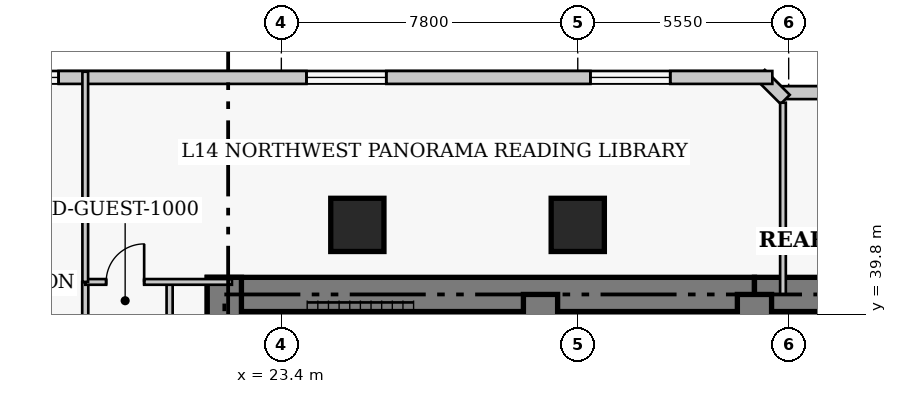
"""IFC4 building model, lengths in metres.
Left out: names, types, materials, properties, quantities, classifications, styles, units other than length and angle.
Written with IfcOpenShell. Run it as: python <this file> out.ifc"""

import sys

from ifc_helpers import new_model, si_unit, direction, frame, frame_2d, origin, origin_2d, place, context, subcontext, project, spatial, rectangle, extrude, element, fill, save


model = new_model("IFC4")
c1 = context("Model", 3, precision=1e-05, world=origin(), true_north=direction((0.0, 1.0)))
c2 = subcontext(c1, "Body", "Model", "MODEL_VIEW")
j1 = project(units=[si_unit("LENGTHUNIT", "METRE"), si_unit("PLANEANGLEUNIT", "RADIAN")], contexts=[c1])
p1 = place(None, origin())
s1 = spatial("IfcSite", under=j1, at=p1, CompositionType="ELEMENT")
p2 = place(p1, origin())
s2 = spatial("IfcBuilding", under=s1, at=p2, CompositionType="ELEMENT")
p3 = place(p2, frame((0.0, 0.0, 60.2)))
s3 = spatial("IfcBuildingStorey", under=s2, at=p3, CompositionType="ELEMENT", Elevation=60.2)
p4 = place(p3, frame((21.45, 40.32, 0.0), z_axis=(0.0, 0.0, 1.0), x_axis=(1.0, 0.0, 0.0)))
e1 = element("IfcWall", 1, at=p4, inside=s3, PredefinedType="SHEAR", context=c2, shape_type="SweptSolid", body=[
    extrude(rectangle(XDim=14.4, YDim=0.9, at=frame_2d((7.2, 0.0))), origin(), (0.0, 0.0, 1.0), 3.8),
])
p5 = place(p3, frame((35.85, 40.32, 0.0), z_axis=(0.0, 0.0, 1.0), x_axis=(1.0, 0.0, 0.0)))
e2 = element("IfcWall", 2, at=p5, inside=s3, PredefinedType="SHEAR", context=c2, shape_type="SweptSolid", body=[
    extrude(rectangle(XDim=12.6, YDim=0.9, at=frame_2d((6.3, 0.0))), origin(), (0.0, 0.0, 1.0), 3.8),
])
p6 = place(p3, frame((21.9, 27.05, 0.0), z_axis=(0.0, 0.0, 1.0), x_axis=(0.0, 1.0, 0.0)))
e3 = element("IfcWall", 3, at=p6, inside=s3, PredefinedType="SHEAR", context=c2, shape_type="SweptSolid", body=[
    extrude(rectangle(XDim=13.72, YDim=0.9, at=frame_2d((6.86, 0.0))), origin(), (0.0, 0.0, 1.0), 3.8),
])
p7 = place(p3, frame((30.22, 33.2, 0.0), z_axis=(0.0, 0.0, 1.0), x_axis=(0.0, 1.0, 0.0)))
e4 = element("IfcWall", 4, at=p7, inside=s3, PredefinedType="SHEAR", context=c2, shape_type="SweptSolid", body=[
    extrude(rectangle(XDim=7.12, YDim=0.9, at=frame_2d((3.56, 0.0))), origin(), (0.0, 0.0, 1.0), 3.8),
])
p8 = place(p3, frame((35.85, 36.37, 0.0), z_axis=(0.0, 0.0, 1.0), x_axis=(0.0, 1.0, 0.0)))
e5 = element("IfcWall", 5, at=p8, inside=s3, PredefinedType="SHEAR", context=c2, shape_type="SweptSolid", body=[
    extrude(rectangle(XDim=3.95, YDim=0.9, at=frame_2d((1.975, 0.0))), origin(), (0.0, 0.0, 1.0), 3.8),
])
p9 = place(p8, frame((0.88, 0.0, 0.0)))
e6 = element("IfcOpeningElement", 6, at=p9, cuts=e5, PredefinedType="OPENING", context=c2, shape_type="SweptSolid", body=[
    extrude(rectangle(XDim=1.1, YDim=2.15, at=frame_2d((0.55, 1.075))), frame((0.0, 0.46, 0.0), z_axis=(0.0, -1.0, 0.0), x_axis=(1.0, 0.0, 0.0)), (0.0, 0.0, 1.0), 0.92),
])
for number, where, z_axis, x_axis in (
    (7, (25.4, 42.15, 0.0), (0.0, 0.0, 1.0), (1.0, 0.0, 0.0)),
    (8, (31.2, 42.15, 0.0), (0.0, 0.0, 1.0), (1.0, 0.0, 0.0)),
):
    element("IfcColumn", number, at=place(p3, frame(where, z_axis=z_axis, x_axis=x_axis)), inside=s3, PredefinedType="COLUMN", context=c2, shape_type="SweptSolid", body=[
        extrude(rectangle(XDim=1.4, YDim=1.4, at=origin_2d()), origin(), (0.0, 0.0, 1.0), 3.8),
    ])
p10 = place(p3, frame((41.42, 45.63, 0.0), z_axis=(0.0, 0.0, 1.0), x_axis=(-1.0, 0.0, 0.0)))
e9 = element("IfcWall", 9, at=p10, inside=s3, PredefinedType="SOLIDWALL", context=c2, shape_type="SweptSolid", body=[
    extrude(rectangle(XDim=4.84, YDim=0.34, at=frame_2d((2.42, 0.0))), origin(), (0.0, 0.0, 1.0), 3.54),
])
p11 = place(p10, frame((1.37, 0.0, 0.85)))
e10 = element("IfcOpeningElement", 10, at=p11, cuts=e9, PredefinedType="OPENING", context=c2, shape_type="SweptSolid", body=[
    extrude(rectangle(XDim=2.1, YDim=1.85, at=frame_2d((1.05, 0.925))), frame((0.0, 0.18, 0.0), z_axis=(0.0, -1.0, 0.0), x_axis=(1.0, 0.0, 0.0)), (0.0, 0.0, 1.0), 0.36),
])
p12 = place(p3, frame((36.658, 45.451, 0.0), z_axis=(0.0, 0.0, 1.0), x_axis=(-0.707106781187, 0.707106781187, 0.0)))
e11 = element("IfcWall", 11, at=p12, inside=s3, PredefinedType="SOLIDWALL", context=c2, shape_type="SweptSolid", body=[
    extrude(rectangle(XDim=0.929, YDim=0.34, at=frame_2d((0.464, 0.0))), origin(), (0.0, 0.0, 1.0), 3.54),
])
p13 = place(p3, frame((36.32, 46.03, 0.0), z_axis=(0.0, 0.0, 1.0), x_axis=(-1.0, 0.0, 0.0)))
e12 = element("IfcWall", 12, at=p13, inside=s3, PredefinedType="SOLIDWALL", context=c2, shape_type="SweptSolid", body=[
    extrude(rectangle(XDim=29.89, YDim=0.34, at=frame_2d((14.945, 0.0))), origin(), (0.0, 0.0, 1.0), 3.54),
])
p14 = place(p13, frame((2.686, 0.0, 0.85)))
e13 = element("IfcOpeningElement", 13, at=p14, cuts=e12, PredefinedType="OPENING", context=c2, shape_type="SweptSolid", body=[
    extrude(rectangle(XDim=2.1, YDim=1.85, at=frame_2d((1.05, 0.925))), frame((0.0, 0.18, 0.0), z_axis=(0.0, -1.0, 0.0), x_axis=(1.0, 0.0, 0.0)), (0.0, 0.0, 1.0), 0.36),
])
p15 = place(p13, frame((10.159, 0.0, 0.85)))
e14 = element("IfcOpeningElement", 14, at=p15, cuts=e12, PredefinedType="OPENING", context=c2, shape_type="SweptSolid", body=[
    extrude(rectangle(XDim=2.1, YDim=1.85, at=frame_2d((1.05, 0.925))), frame((0.0, 0.18, 0.0), z_axis=(0.0, -1.0, 0.0), x_axis=(1.0, 0.0, 0.0)), (0.0, 0.0, 1.0), 0.36),
])
p16 = place(p13, frame((18.781, 0.0, 0.85)))
e15 = element("IfcOpeningElement", 15, at=p16, cuts=e12, PredefinedType="OPENING", context=c2, shape_type="SweptSolid", body=[
    extrude(rectangle(XDim=2.1, YDim=1.85, at=frame_2d((1.05, 0.925))), frame((0.0, 0.18, 0.0), z_axis=(0.0, -1.0, 0.0), x_axis=(1.0, 0.0, 0.0)), (0.0, 0.0, 1.0), 0.36),
])
p17 = place(p13, frame((25.104, 0.0, 0.85)))
e16 = element("IfcOpeningElement", 16, at=p17, cuts=e12, PredefinedType="OPENING", context=c2, shape_type="SweptSolid", body=[
    extrude(rectangle(XDim=2.1, YDim=1.85, at=frame_2d((1.05, 0.925))), frame((0.0, 0.18, 0.0), z_axis=(0.0, -1.0, 0.0), x_axis=(1.0, 0.0, 0.0)), (0.0, 0.0, 1.0), 0.36),
])
p18 = place(p3, frame((18.24, 5.05, 0.0), z_axis=(0.0, 0.0, 1.0), x_axis=(0.0, 1.0, 0.0)))
e17 = element("IfcWall", 17, at=p18, inside=s3, PredefinedType="PARTITIONING", context=c2, shape_type="SweptSolid", body=[
    extrude(rectangle(XDim=35.6, YDim=0.16, at=frame_2d((17.8, 0.0))), origin(), (0.0, 0.0, 1.0), 3.54),
])
p19 = place(p18, frame((2.6, 0.0, 0.0)))
e18 = element("IfcOpeningElement", 18, at=p19, cuts=e17, PredefinedType="OPENING", context=c2, shape_type="SweptSolid", body=[
    extrude(rectangle(XDim=0.95, YDim=2.1, at=frame_2d((0.475, 1.05))), frame((0.0, 0.09, 0.0), z_axis=(0.0, -1.0, 0.0), x_axis=(1.0, 0.0, 0.0)), (0.0, 0.0, 1.0), 0.18),
])
p20 = place(p18, frame((10.075, 0.0, 0.0)))
e19 = element("IfcOpeningElement", 19, at=p20, cuts=e17, PredefinedType="OPENING", context=c2, shape_type="SweptSolid", body=[
    extrude(rectangle(XDim=0.95, YDim=2.1, at=frame_2d((0.475, 1.05))), frame((0.0, 0.09, 0.0), z_axis=(0.0, -1.0, 0.0), x_axis=(1.0, 0.0, 0.0)), (0.0, 0.0, 1.0), 0.18),
])
p21 = place(p18, frame((18.875, 0.0, 0.0)))
e20 = element("IfcOpeningElement", 20, at=p21, cuts=e17, PredefinedType="OPENING", context=c2, shape_type="SweptSolid", body=[
    extrude(rectangle(XDim=0.95, YDim=2.1, at=frame_2d((0.475, 1.05))), frame((0.0, 0.09, 0.0), z_axis=(0.0, -1.0, 0.0), x_axis=(1.0, 0.0, 0.0)), (0.0, 0.0, 1.0), 0.18),
])
p22 = place(p18, frame((26.575, 0.0, 0.0)))
e21 = element("IfcOpeningElement", 21, at=p22, cuts=e17, PredefinedType="OPENING", context=c2, shape_type="SweptSolid", body=[
    extrude(rectangle(XDim=0.95, YDim=2.1, at=frame_2d((0.475, 1.05))), frame((0.0, 0.09, 0.0), z_axis=(0.0, -1.0, 0.0), x_axis=(1.0, 0.0, 0.0)), (0.0, 0.0, 1.0), 0.18),
])
p23 = place(p18, frame((32.53, 0.0, 0.0)))
e22 = element("IfcOpeningElement", 22, at=p23, cuts=e17, PredefinedType="OPENING", context=c2, shape_type="SweptSolid", body=[
    extrude(rectangle(XDim=1.0, YDim=2.15, at=frame_2d((0.5, 1.075))), frame((0.0, 0.09, 0.0), z_axis=(0.0, -1.0, 0.0), x_axis=(1.0, 0.0, 0.0)), (0.0, 0.0, 1.0), 0.18),
])
p24 = place(p3, frame((20.46, 35.02, 0.0), z_axis=(0.0, 0.0, 1.0), x_axis=(0.0, 1.0, 0.0)))
e23 = element("IfcWall", 23, at=p24, inside=s3, PredefinedType="PARTITIONING", context=c2, shape_type="SweptSolid", body=[
    extrude(rectangle(XDim=5.63, YDim=0.16, at=frame_2d((2.815, 0.0))), origin(), (0.0, 0.0, 1.0), 3.54),
])
p25 = place(p3, frame((18.24, 40.65, 0.0), z_axis=(0.0, 0.0, 1.0), x_axis=(1.0, 0.0, 0.0)))
e24 = element("IfcWall", 24, at=p25, inside=s3, PredefinedType="PARTITIONING", context=c2, shape_type="SweptSolid", body=[
    extrude(rectangle(XDim=3.86, YDim=0.15, at=frame_2d((1.93, 0.0))), origin(), (0.0, 0.0, 1.0), 3.54),
])
p26 = place(p25, frame((0.55, 0.0, 0.0)))
e25 = element("IfcOpeningElement", 25, at=p26, cuts=e24, PredefinedType="OPENING", context=c2, shape_type="SweptSolid", body=[
    extrude(rectangle(XDim=1.0, YDim=2.15, at=frame_2d((0.5, 1.075))), frame((0.0, 0.085, 0.0), z_axis=(0.0, -1.0, 0.0), x_axis=(1.0, 0.0, 0.0)), (0.0, 0.0, 1.0), 0.17),
])
p27 = place(p3, frame((18.24, 40.65, 0.0), z_axis=(0.0, 0.0, 1.0), x_axis=(0.0, 1.0, 0.0)))
e26 = element("IfcWall", 26, at=p27, inside=s3, PredefinedType="PARTITIONING", context=c2, shape_type="SweptSolid", body=[
    extrude(rectangle(XDim=5.53, YDim=0.15, at=frame_2d((2.765, 0.0))), origin(), (0.0, 0.0, 1.0), 3.54),
])
p28 = place(p3, frame((36.6, 40.32, 0.0), z_axis=(0.0, 0.0, 1.0), x_axis=(0.0, 1.0, 0.0)))
e27 = element("IfcWall", 27, at=p28, inside=s3, PredefinedType="PARTITIONING", context=c2, shape_type="SweptSolid", body=[
    extrude(rectangle(XDim=5.045, YDim=0.15, at=frame_2d((2.522, 0.0))), origin(), (0.0, 0.0, 1.0), 3.54),
])
p29 = place(p14, origin())
e28 = element("IfcWindow", 28, at=p29, inside=s3, PartitioningType="SINGLE_PANEL", PredefinedType="WINDOW", context=c2, shape_type="SweptSolid", body=[
    extrude(rectangle(XDim=2.1, YDim=1.85, at=frame_2d((1.05, 0.925))), frame((0.0, 0.03, 0.0), z_axis=(0.0, -1.0, 0.0), x_axis=(1.0, 0.0, 0.0)), (0.0, 0.0, 1.0), 0.06),
])
fill(e13, e28)
p30 = place(p15, origin())
e29 = element("IfcWindow", 29, at=p30, inside=s3, PartitioningType="SINGLE_PANEL", PredefinedType="WINDOW", context=c2, shape_type="SweptSolid", body=[
    extrude(rectangle(XDim=2.1, YDim=1.85, at=frame_2d((1.05, 0.925))), frame((0.0, 0.03, 0.0), z_axis=(0.0, -1.0, 0.0), x_axis=(1.0, 0.0, 0.0)), (0.0, 0.0, 1.0), 0.06),
])
fill(e14, e29)
p31 = place(p16, origin())
e30 = element("IfcWindow", 30, at=p31, inside=s3, PartitioningType="SINGLE_PANEL", PredefinedType="WINDOW", context=c2, shape_type="SweptSolid", body=[
    extrude(rectangle(XDim=2.1, YDim=1.85, at=frame_2d((1.05, 0.925))), frame((0.0, 0.03, 0.0), z_axis=(0.0, -1.0, 0.0), x_axis=(1.0, 0.0, 0.0)), (0.0, 0.0, 1.0), 0.06),
])
fill(e15, e30)
p32 = place(p26, origin())
e31 = element("IfcDoor", 31, at=p32, inside=s3, OperationType="SINGLE_SWING_RIGHT", PredefinedType="DOOR", context=c2, shape_type="SweptSolid", body=[
    extrude(rectangle(XDim=1.0, YDim=2.15, at=frame_2d((0.5, 1.075))), frame((0.0, 0.025, 0.0), z_axis=(0.0, -1.0, 0.0), x_axis=(1.0, 0.0, 0.0)), (0.0, 0.0, 1.0), 0.05),
])
fill(e25, e31)
save(model, sys.argv[1])
